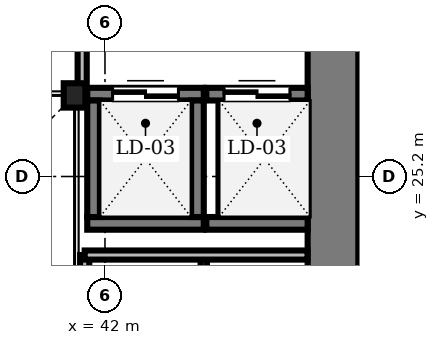
"""IFC4 building model, lengths in metres.
Left out: names, types, materials, properties, quantities, classifications, styles, units other than length and angle.
Written with IfcOpenShell. Run it as: python <this file> out.ifc"""

import sys

from ifc_helpers import new_model, si_unit, direction, frame, frame_2d, origin, origin_2d, place, context, subcontext, project, spatial, rectangle, i_section, extrude, source, transform, mapped, element, fill, save


model = new_model("IFC4")
c1 = context("Model", 3, precision=1e-05, world=origin(), true_north=direction((0.0, 1.0)))
c2 = subcontext(c1, "Body", "Model", "MODEL_VIEW")
j1 = project(units=[si_unit("LENGTHUNIT", "METRE"), si_unit("PLANEANGLEUNIT", "RADIAN")], contexts=[c1])
p1 = place(None, origin())
s1 = spatial("IfcSite", under=j1, at=p1, CompositionType="ELEMENT")
p2 = place(p1, origin())
s2 = spatial("IfcBuilding", under=s1, at=p2, CompositionType="ELEMENT")
p3 = place(p2, frame((0.0, 0.0, 42.2)))
s3 = spatial("IfcBuildingStorey", under=s2, at=p3, CompositionType="ELEMENT", Elevation=42.2)
m1 = source(origin(), c2, "Body", "SweptSolid", [
    extrude(rectangle(XDim=13.15, YDim=1.0, at=frame_2d((6.575, 0.0))), origin(), (0.0, 0.0, 1.0), 3.41),
])
p4 = place(p3, frame((46.5, 17.5, 0.0), z_axis=(0.0, 0.0, 1.0), x_axis=(0.0, 1.0, 0.0)))
e1 = element("IfcWall", 1, at=p4, inside=s3, PredefinedType="SHEAR", context=c2, shape_type="MappedRepresentation", body=[
    mapped(m1, transform((0.0, 0.0, 0.0), scale=1.0)),
])
m2 = source(origin(), c2, "Body", "SweptSolid", [
    extrude(i_section(OverallWidth=0.428, OverallDepth=0.481, WebThickness=0.04, FlangeThickness=0.063, FilletRadius=0.015, at=origin_2d()), origin(), (0.0, 0.0, 1.0), 3.41),
])
p5 = place(p3, frame((41.4, 26.8, 0.0), z_axis=(0.0, 0.0, 1.0), x_axis=(1.0, 0.0, 0.0)))
e2 = element("IfcColumn", 2, at=p5, inside=s3, PredefinedType="COLUMN", context=c2, shape_type="MappedRepresentation", body=[
    mapped(m2, transform((0.0, 0.0, 0.0), scale=1.0)),
])
m3 = source(origin(), c2, "Body", "SweptSolid", [
    extrude(rectangle(XDim=2.3, YDim=0.25, at=frame_2d((1.15, 0.0))), origin(), (0.0, 0.0, 1.0), 3.41),
])
p6 = place(p3, frame((41.65, 24.275, 0.0), z_axis=(0.0, 0.0, 1.0), x_axis=(1.0, 0.0, 0.0)))
e3 = element("IfcWall", 3, at=p6, inside=s3, PredefinedType="SOLIDWALL", context=c2, shape_type="MappedRepresentation", body=[
    mapped(m3, transform((0.0, 0.0, 0.0), scale=1.0)),
])
p7 = place(p3, frame((41.65, 26.825, 0.0), z_axis=(0.0, 0.0, 1.0), x_axis=(1.0, 0.0, 0.0)))
e4 = element("IfcWall", 4, at=p7, inside=s3, PredefinedType="SOLIDWALL", context=c2, shape_type="MappedRepresentation", body=[
    mapped(m3, transform((0.0, 0.0, 0.0), scale=1.0)),
])
m4 = source(origin(), c2, "Body", "SweptSolid", [
    extrude(rectangle(XDim=1.3, YDim=2.3, at=frame_2d((0.65, 1.15))), frame((0.0, 0.135, 0.0), z_axis=(0.0, -1.0, 0.0), x_axis=(1.0, 0.0, 0.0)), (0.0, 0.0, 1.0), 0.27),
])
p8 = place(p7, frame((0.5, 0.0, 0.0)))
e5 = element("IfcOpeningElement", 5, at=p8, cuts=e4, PredefinedType="OPENING", context=c2, shape_type="MappedRepresentation", body=[
    mapped(m4, transform((0.0, 0.0, 0.0), scale=1.0)),
])
for number, where, z_axis, x_axis in (
    (6, (41.775, 24.4, 0.0), (0.0, 0.0, 1.0), (0.0, 1.0, 0.0)),
    (7, (43.825, 24.4, 0.0), (0.0, 0.0, 1.0), (0.0, 1.0, 0.0)),
):
    element("IfcWall", number, at=place(p3, frame(where, z_axis=z_axis, x_axis=x_axis)), inside=s3, PredefinedType="SOLIDWALL", context=c2, shape_type="MappedRepresentation", body=[
        mapped(m3, transform((0.0, 0.0, 0.0), scale=1.0)),
    ])
m5 = source(origin(), c2, "Body", "SweptSolid", [
    extrude(rectangle(XDim=2.0, YDim=0.25, at=frame_2d((1.0, 0.0))), origin(), (0.0, 0.0, 1.0), 3.41),
])
p9 = place(p3, frame((44.0, 24.275, 0.0), z_axis=(0.0, 0.0, 1.0), x_axis=(1.0, 0.0, 0.0)))
e8 = element("IfcWall", 8, at=p9, inside=s3, PredefinedType="SOLIDWALL", context=c2, shape_type="MappedRepresentation", body=[
    mapped(m5, transform((0.0, 0.0, 0.0), scale=1.0)),
])
p10 = place(p3, frame((44.0, 26.825, 0.0), z_axis=(0.0, 0.0, 1.0), x_axis=(1.0, 0.0, 0.0)))
e9 = element("IfcWall", 9, at=p10, inside=s3, PredefinedType="SOLIDWALL", context=c2, shape_type="MappedRepresentation", body=[
    mapped(m5, transform((0.0, 0.0, 0.0), scale=1.0)),
])
p11 = place(p10, frame((0.35, 0.0, 0.0)))
e10 = element("IfcOpeningElement", 10, at=p11, cuts=e9, PredefinedType="OPENING", context=c2, shape_type="MappedRepresentation", body=[
    mapped(m4, transform((0.0, 0.0, 0.0), scale=1.0)),
])
m6 = source(origin(), c2, "Body", "SweptSolid", [
    extrude(rectangle(XDim=7.15, YDim=0.18, at=frame_2d((3.575, 0.0))), origin(), (0.0, 0.0, 1.0), 2.802),
])
p12 = place(p3, frame((41.6, 16.5, 0.0), z_axis=(0.0, 0.0, 1.0), x_axis=(0.0, 1.0, 0.0)))
e11 = element("IfcWall", 11, at=p12, inside=s3, PredefinedType="PARTITIONING", context=c2, shape_type="MappedRepresentation", body=[
    mapped(m6, transform((0.0, 0.0, 0.0), scale=1.0)),
])
m7 = source(origin(), c2, "Body", "SweptSolid", [
    extrude(rectangle(XDim=7.15, YDim=0.125, at=frame_2d((3.575, 0.0))), origin(), (0.0, 0.0, 1.0), 2.802),
])
p13 = place(p3, frame((43.95, 16.5, 0.0), z_axis=(0.0, 0.0, 1.0), x_axis=(0.0, 1.0, 0.0)))
e12 = element("IfcWall", 12, at=p13, inside=s3, PredefinedType="PARTITIONING", context=c2, shape_type="MappedRepresentation", body=[
    mapped(m7, transform((0.0, 0.0, 0.0), scale=1.0)),
])
m8 = source(origin(), c2, "Body", "SweptSolid", [
    extrude(rectangle(XDim=4.398, YDim=0.18, at=frame_2d((2.199, 0.0))), origin(), (0.0, 0.0, 1.0), 3.41),
])
p14 = place(p3, frame((41.6, 23.65, 0.0), z_axis=(0.0, 0.0, 1.0), x_axis=(1.0, 0.0, 0.0)))
e13 = element("IfcWall", 13, at=p14, inside=s3, PredefinedType="PARTITIONING", context=c2, shape_type="MappedRepresentation", body=[
    mapped(m8, transform((0.0, 0.0, 0.0), scale=1.0)),
])
m9 = source(origin(), c2, "Body", "SweptSolid", [
    extrude(rectangle(XDim=2.35, YDim=0.18, at=frame_2d((1.175, 0.0))), origin(), (0.0, 0.0, 1.0), 2.802),
])
p15 = place(p3, frame((41.55, 26.8, 0.0), z_axis=(0.0, 0.0, 1.0), x_axis=(0.0, 1.0, 0.0)))
e14 = element("IfcWall", 14, at=p15, inside=s3, PredefinedType="PARTITIONING", context=c2, shape_type="MappedRepresentation", body=[
    mapped(m9, transform((0.0, 0.0, 0.0), scale=1.0)),
])
m10 = source(origin(), c2, "Body", "SweptSolid", [
    extrude(rectangle(XDim=1.3, YDim=2.3, at=frame_2d((0.65, 1.15))), frame((0.0, 0.025, 0.0), z_axis=(0.0, -1.0, 0.0), x_axis=(1.0, 0.0, 0.0)), (0.0, 0.0, 1.0), 0.05),
])
p16 = place(p8, origin())
e15 = element("IfcDoor", 15, at=p16, inside=s3, OperationType="DOUBLE_DOOR_SLIDING", PredefinedType="DOOR", context=c2, shape_type="MappedRepresentation", body=[
    mapped(m10, transform((0.0, 0.0, 0.0), scale=1.0)),
])
fill(e5, e15)
p17 = place(p11, origin())
e16 = element("IfcDoor", 16, at=p17, inside=s3, OperationType="DOUBLE_DOOR_SLIDING", PredefinedType="DOOR", context=c2, shape_type="MappedRepresentation", body=[
    mapped(m10, transform((0.0, 0.0, 0.0), scale=1.0)),
])
fill(e10, e16)
save(model, sys.argv[1])
